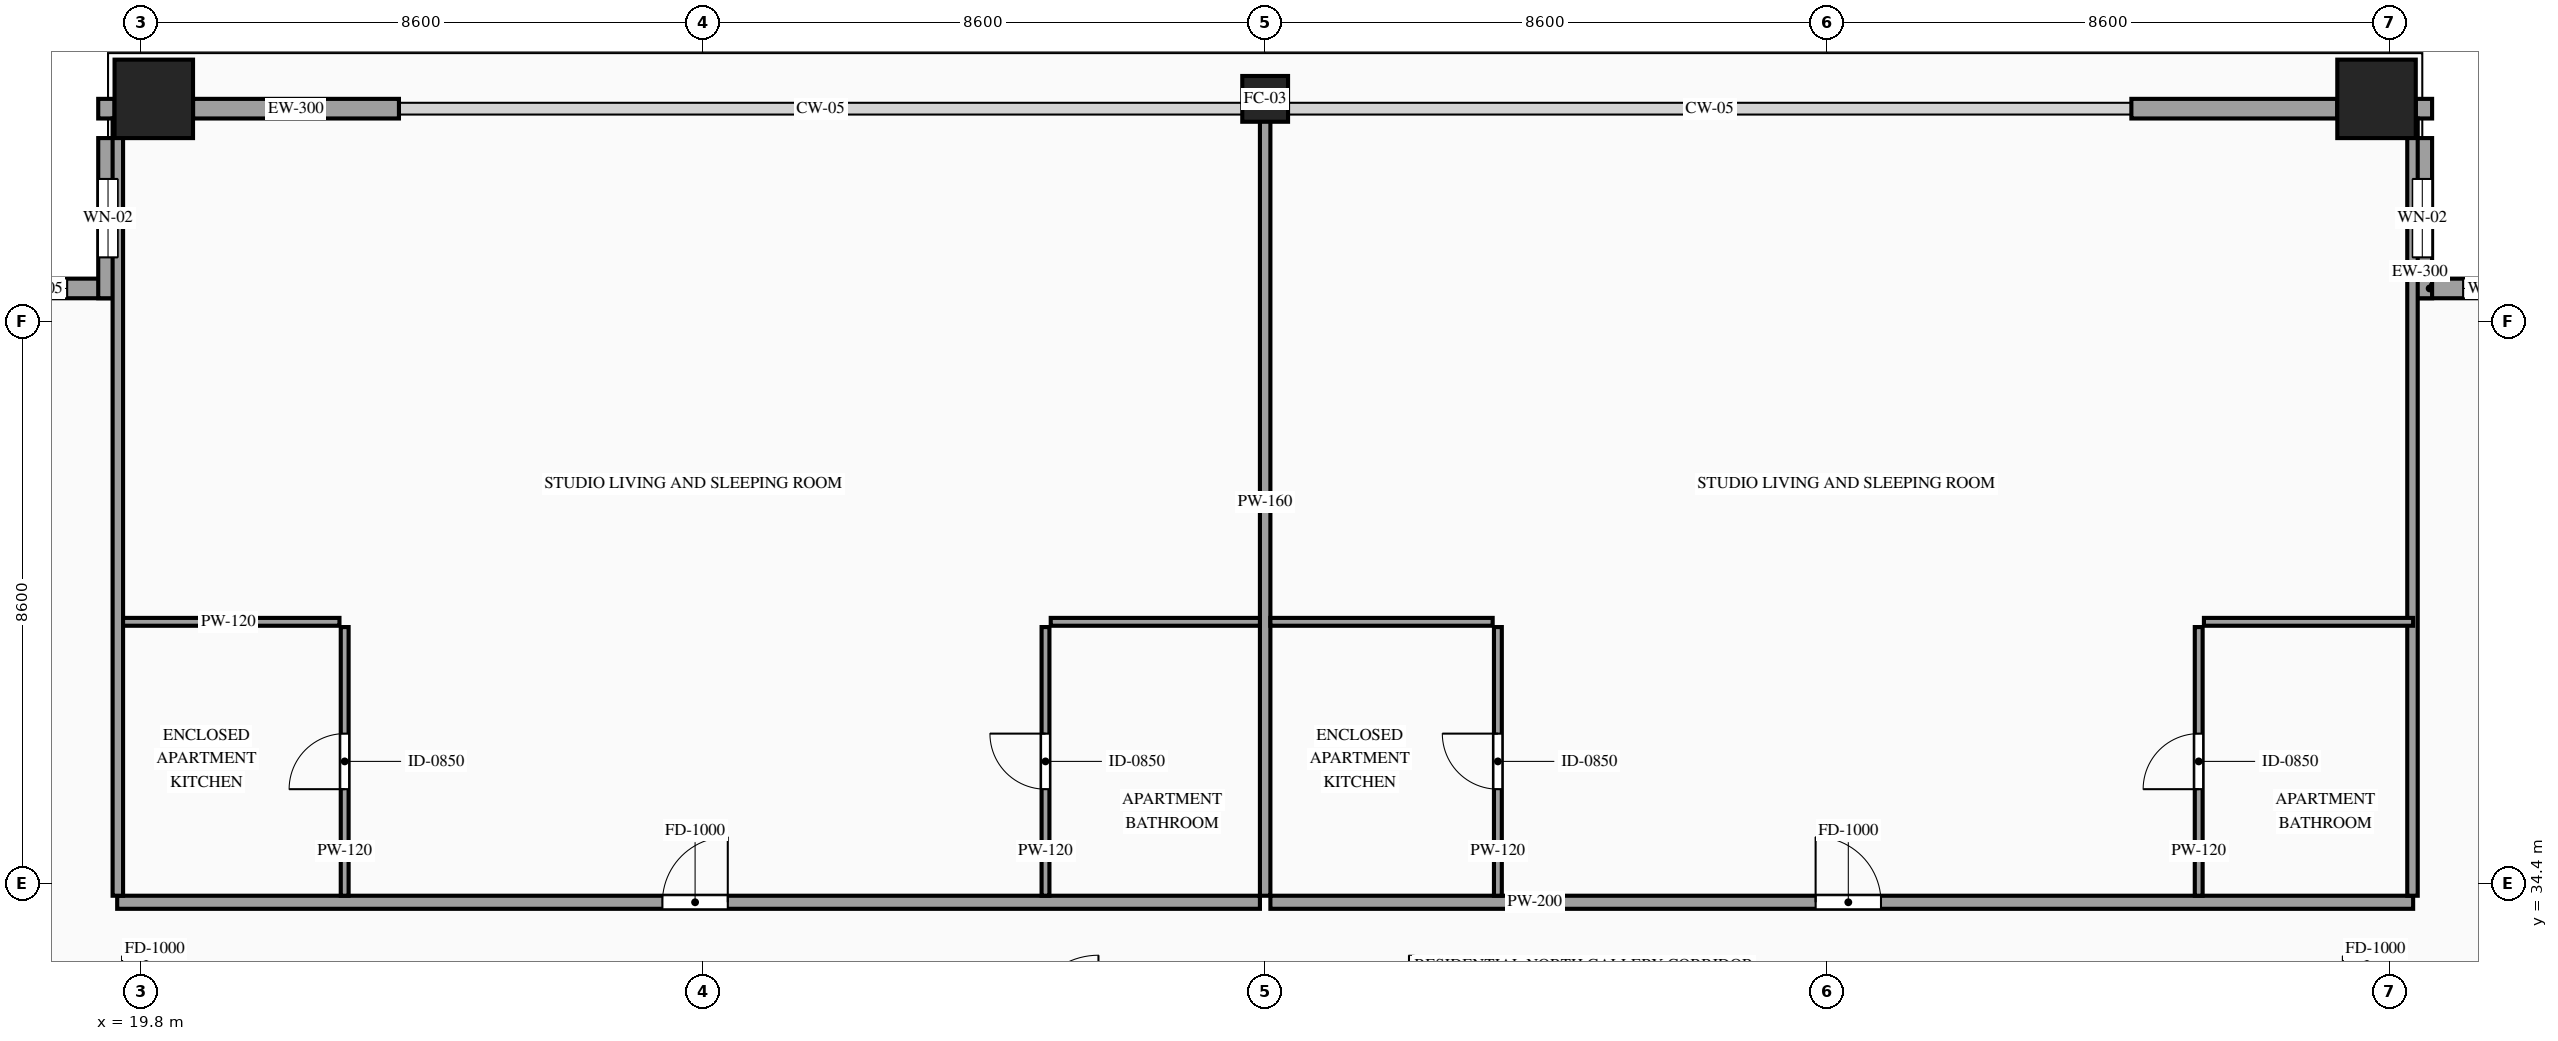
"""IFC4 building model, lengths in metres.
Left out: names, types, materials, properties, quantities, classifications, styles, units other than length and angle.
Written with IfcOpenShell. Run it as: python <this file> out.ifc"""

import sys

from ifc_helpers import new_model, si_unit, direction, frame, frame_2d, origin, origin_2d, place, context, subcontext, project, spatial, rectangle, hollow_rectangle, extrude, source, transform, mapped, element, fill, save


model = new_model("IFC4")
c1 = context("Model", 3, precision=1e-05, world=origin(), true_north=direction((0.0, 1.0)))
c2 = subcontext(c1, "Body", "Model", "MODEL_VIEW")
j1 = project(units=[si_unit("LENGTHUNIT", "METRE"), si_unit("PLANEANGLEUNIT", "RADIAN")], contexts=[c1])
p1 = place(None, origin())
s1 = spatial("IfcSite", under=j1, at=p1, CompositionType="ELEMENT")
p2 = place(p1, origin())
s2 = spatial("IfcBuilding", under=s1, at=p2, CompositionType="ELEMENT")
p3 = place(p2, frame((0.0, 0.0, 224.1)))
s3 = spatial("IfcBuildingStorey", under=s2, at=p3, CompositionType="ELEMENT", Elevation=224.1)
m1 = source(origin(), c2, "Body", "SweptSolid", [
    extrude(hollow_rectangle(XDim=1.2, YDim=1.2, WallThickness=0.055, at=origin_2d()), origin(), (0.0, 0.0, 1.0), 3.5),
])
p4 = place(p3, frame((20.0, 46.4, 0.0), z_axis=(0.0, 0.0, 1.0), x_axis=(1.0, 0.0, 0.0)))
e1 = element("IfcColumn", 1, at=p4, inside=s3, PredefinedType="COLUMN", context=c2, shape_type="MappedRepresentation", body=[
    mapped(m1, transform((0.0, 0.0, 0.0), scale=1.0)),
])
m2 = source(origin(), c2, "Body", "SweptSolid", [
    extrude(hollow_rectangle(XDim=0.7, YDim=0.7, WallThickness=0.032, at=origin_2d()), origin(), (0.0, 0.0, 1.0), 3.5),
])
p5 = place(p3, frame((37.0, 46.4, 0.0), z_axis=(0.0, 0.0, 1.0), x_axis=(1.0, 0.0, 0.0)))
e2 = element("IfcColumn", 2, at=p5, inside=s3, PredefinedType="COLUMN", context=c2, shape_type="MappedRepresentation", body=[
    mapped(m2, transform((0.0, 0.0, 0.0), scale=1.0)),
])
p6 = place(p3, frame((54.0, 46.4, 0.0), z_axis=(0.0, 0.0, 1.0), x_axis=(1.0, 0.0, 0.0)))
e3 = element("IfcColumn", 3, at=p6, inside=s3, PredefinedType="COLUMN", context=c2, shape_type="MappedRepresentation", body=[
    mapped(m1, transform((0.0, 0.0, 0.0), scale=1.0)),
])
p7 = place(p3, frame((19.45, 43.5, 0.0), z_axis=(0.0, 0.0, 1.0), x_axis=(-1.0, 0.0, 0.0)))
e4 = element("IfcWall", 4, at=p7, inside=s3, PredefinedType="SOLIDWALL", context=c2, shape_type="SweptSolid", body=[
    extrude(rectangle(XDim=2.45, YDim=0.3, at=frame_2d((1.225, 0.0))), origin(), (0.0, 0.0, 1.0), 3.28),
])
p8 = place(p7, frame((0.775, 0.0, 0.85)))
e5 = element("IfcOpeningElement", 5, at=p8, cuts=e4, PredefinedType="OPENING", context=c2, shape_type="SweptSolid", body=[
    extrude(rectangle(XDim=0.9, YDim=1.5, at=frame_2d((0.45, 0.75))), frame((0.0, 0.165, 0.0), z_axis=(0.0, -1.0, 0.0), x_axis=(1.0, 0.0, 0.0)), (0.0, 0.0, 1.0), 0.33),
])
p9 = place(p3, frame((19.3, 45.8, 0.0), z_axis=(0.0, 0.0, 1.0), x_axis=(0.0, -1.0, 0.0)))
e6 = element("IfcWall", 6, at=p9, inside=s3, PredefinedType="SOLIDWALL", context=c2, shape_type="SweptSolid", body=[
    extrude(rectangle(XDim=2.45, YDim=0.3, at=frame_2d((1.225, 0.0))), origin(), (0.0, 0.0, 1.0), 3.28),
])
p10 = place(p9, frame((0.625, 0.0, 0.85)))
e7 = element("IfcOpeningElement", 7, at=p10, cuts=e6, PredefinedType="OPENING", context=c2, shape_type="SweptSolid", body=[
    extrude(rectangle(XDim=1.2, YDim=2.1, at=frame_2d((0.6, 1.05))), frame((0.0, 0.165, 0.0), z_axis=(0.0, -1.0, 0.0), x_axis=(1.0, 0.0, 0.0)), (0.0, 0.0, 1.0), 0.33),
])
p11 = place(p3, frame((57.0, 43.5, 0.0), z_axis=(0.0, 0.0, 1.0), x_axis=(-1.0, 0.0, 0.0)))
e8 = element("IfcWall", 8, at=p11, inside=s3, PredefinedType="SOLIDWALL", context=c2, shape_type="SweptSolid", body=[
    extrude(rectangle(XDim=2.45, YDim=0.3, at=frame_2d((1.225, 0.0))), origin(), (0.0, 0.0, 1.0), 3.28),
])
p12 = place(p11, frame((0.775, 0.0, 0.85)))
e9 = element("IfcOpeningElement", 9, at=p12, cuts=e8, PredefinedType="OPENING", context=c2, shape_type="SweptSolid", body=[
    extrude(rectangle(XDim=0.9, YDim=1.5, at=frame_2d((0.45, 0.75))), frame((0.0, 0.165, 0.0), z_axis=(0.0, -1.0, 0.0), x_axis=(1.0, 0.0, 0.0)), (0.0, 0.0, 1.0), 0.33),
])
p13 = place(p3, frame((54.7, 43.35, 0.0), z_axis=(0.0, 0.0, 1.0), x_axis=(0.0, 1.0, 0.0)))
e10 = element("IfcWall", 10, at=p13, inside=s3, PredefinedType="SOLIDWALL", context=c2, shape_type="SweptSolid", body=[
    extrude(rectangle(XDim=2.45, YDim=0.3, at=frame_2d((1.225, 0.0))), origin(), (0.0, 0.0, 1.0), 3.28),
])
p14 = place(p13, frame((0.625, 0.0, 0.85)))
e11 = element("IfcOpeningElement", 11, at=p14, cuts=e10, PredefinedType="OPENING", context=c2, shape_type="SweptSolid", body=[
    extrude(rectangle(XDim=1.2, YDim=2.1, at=frame_2d((0.6, 1.05))), frame((0.0, 0.165, 0.0), z_axis=(0.0, -1.0, 0.0), x_axis=(1.0, 0.0, 0.0)), (0.0, 0.0, 1.0), 0.33),
])
m3 = source(origin(), c2, "Body", "SweptSolid", [
    extrude(rectangle(XDim=0.25, YDim=0.3, at=frame_2d((0.125, 0.0))), origin(), (0.0, 0.0, 1.0), 3.28),
])
for number, where, z_axis, x_axis in (
    (12, (19.15, 46.25, 0.0), (0.0, 0.0, 1.0), (1.0, 0.0, 0.0)),
    (13, (54.6, 46.25, 0.0), (0.0, 0.0, 1.0), (1.0, 0.0, 0.0)),
):
    element("IfcWall", number, at=place(p3, frame(where, z_axis=z_axis, x_axis=x_axis)), inside=s3, PredefinedType="SOLIDWALL", context=c2, shape_type="MappedRepresentation", body=[
        mapped(m3, transform((0.0, 0.0, 0.0), scale=1.0)),
    ])
m4 = source(origin(), c2, "Body", "SweptSolid", [
    extrude(rectangle(XDim=3.15, YDim=0.3, at=frame_2d((1.575, 0.0))), origin(), (0.0, 0.0, 1.0), 2.835),
])
for number, where, z_axis, x_axis in (
    (14, (20.6, 46.25, 0.0), (0.0, 0.0, 1.0), (1.0, 0.0, 0.0)),
    (15, (50.25, 46.25, 0.0), (0.0, 0.0, 1.0), (1.0, 0.0, 0.0)),
):
    element("IfcWall", number, at=place(p3, frame(where, z_axis=z_axis, x_axis=x_axis)), inside=s3, PredefinedType="SOLIDWALL", context=c2, shape_type="MappedRepresentation", body=[
        mapped(m4, transform((0.0, 0.0, 0.0), scale=1.0)),
    ])
p15 = place(p3, frame((19.44, 34.11, 0.0), z_axis=(0.0, 0.0, 1.0), x_axis=(1.0, 0.0, 0.0)))
e16 = element("IfcWall", 16, at=p15, inside=s3, PredefinedType="PARTITIONING", context=c2, shape_type="SweptSolid", body=[
    extrude(rectangle(XDim=17.48, YDim=0.2, at=frame_2d((8.74, 0.0))), origin(), (0.0, 0.0, 1.0), 3.28),
])
p16 = place(p15, frame((8.34, 0.0, 0.0)))
e17 = element("IfcOpeningElement", 17, at=p16, cuts=e16, PredefinedType="OPENING", context=c2, shape_type="SweptSolid", body=[
    extrude(rectangle(XDim=1.0, YDim=2.2, at=frame_2d((0.5, 1.1))), frame((0.0, 0.115, 0.0), z_axis=(0.0, -1.0, 0.0), x_axis=(1.0, 0.0, 0.0)), (0.0, 0.0, 1.0), 0.23),
])
m5 = source(origin(), c2, "Body", "SweptSolid", [
    extrude(rectangle(XDim=12.04, YDim=0.16, at=frame_2d((6.02, 0.0))), origin(), (0.0, 0.0, 1.0), 2.787),
])
p17 = place(p3, frame((37.0, 34.21, 0.0), z_axis=(0.0, 0.0, 1.0), x_axis=(0.0, 1.0, 0.0)))
e18 = element("IfcWall", 18, at=p17, inside=s3, PredefinedType="PARTITIONING", context=c2, shape_type="MappedRepresentation", body=[
    mapped(m5, transform((0.0, 0.0, 0.0), scale=1.0)),
])
m6 = source(origin(), c2, "Body", "SweptSolid", [
    extrude(rectangle(XDim=3.4, YDim=0.12, at=frame_2d((1.7, 0.0))), origin(), (0.0, 0.0, 1.0), 3.28),
])
p18 = place(p3, frame((19.44, 38.4, 0.0), z_axis=(0.0, 0.0, 1.0), x_axis=(1.0, 0.0, 0.0)))
e19 = element("IfcWall", 19, at=p18, inside=s3, PredefinedType="PARTITIONING", context=c2, shape_type="MappedRepresentation", body=[
    mapped(m6, transform((0.0, 0.0, 0.0), scale=1.0)),
])
p19 = place(p3, frame((22.92, 34.21, 0.0), z_axis=(0.0, 0.0, 1.0), x_axis=(0.0, 1.0, 0.0)))
e20 = element("IfcWall", 20, at=p19, inside=s3, PredefinedType="PARTITIONING", context=c2, shape_type="SweptSolid", body=[
    extrude(rectangle(XDim=4.11, YDim=0.12, at=frame_2d((2.055, 0.0))), origin(), (0.0, 0.0, 1.0), 3.28),
])
p20 = place(p19, frame((1.63, 0.0, 0.0)))
e21 = element("IfcOpeningElement", 21, at=p20, cuts=e20, PredefinedType="OPENING", context=c2, shape_type="SweptSolid", body=[
    extrude(rectangle(XDim=0.85, YDim=2.1, at=frame_2d((0.425, 1.05))), frame((0.0, 0.075, 0.0), z_axis=(0.0, -1.0, 0.0), x_axis=(1.0, 0.0, 0.0)), (0.0, 0.0, 1.0), 0.15),
])
m7 = source(origin(), c2, "Body", "SweptSolid", [
    extrude(rectangle(XDim=3.2, YDim=0.12, at=frame_2d((1.6, 0.0))), origin(), (0.0, 0.0, 1.0), 3.28),
])
p21 = place(p3, frame((33.72, 38.4, 0.0), z_axis=(0.0, 0.0, 1.0), x_axis=(1.0, 0.0, 0.0)))
e22 = element("IfcWall", 22, at=p21, inside=s3, PredefinedType="PARTITIONING", context=c2, shape_type="MappedRepresentation", body=[
    mapped(m7, transform((0.0, 0.0, 0.0), scale=1.0)),
])
p22 = place(p3, frame((33.64, 34.21, 0.0), z_axis=(0.0, 0.0, 1.0), x_axis=(0.0, 1.0, 0.0)))
e23 = element("IfcWall", 23, at=p22, inside=s3, PredefinedType="PARTITIONING", context=c2, shape_type="SweptSolid", body=[
    extrude(rectangle(XDim=4.11, YDim=0.12, at=frame_2d((2.055, 0.0))), origin(), (0.0, 0.0, 1.0), 3.28),
])
p23 = place(p22, frame((1.63, 0.0, 0.0)))
e24 = element("IfcOpeningElement", 24, at=p23, cuts=e23, PredefinedType="OPENING", context=c2, shape_type="SweptSolid", body=[
    extrude(rectangle(XDim=0.85, YDim=2.1, at=frame_2d((0.425, 1.05))), frame((0.0, 0.075, 0.0), z_axis=(0.0, -1.0, 0.0), x_axis=(1.0, 0.0, 0.0)), (0.0, 0.0, 1.0), 0.15),
])
p24 = place(p3, frame((37.08, 34.11, 0.0), z_axis=(0.0, 0.0, 1.0), x_axis=(1.0, 0.0, 0.0)))
e25 = element("IfcWall", 25, at=p24, inside=s3, PredefinedType="PARTITIONING", context=c2, shape_type="SweptSolid", body=[
    extrude(rectangle(XDim=17.48, YDim=0.2, at=frame_2d((8.74, 0.0))), origin(), (0.0, 0.0, 1.0), 3.28),
])
p25 = place(p24, frame((8.34, 0.0, 0.0)))
e26 = element("IfcOpeningElement", 26, at=p25, cuts=e25, PredefinedType="OPENING", context=c2, shape_type="SweptSolid", body=[
    extrude(rectangle(XDim=1.0, YDim=2.2, at=frame_2d((0.5, 1.1))), frame((0.0, 0.115, 0.0), z_axis=(0.0, -1.0, 0.0), x_axis=(1.0, 0.0, 0.0)), (0.0, 0.0, 1.0), 0.23),
])
m8 = source(origin(), c2, "Body", "SweptSolid", [
    extrude(rectangle(XDim=11.89, YDim=0.16, at=frame_2d((5.945, 0.0))), origin(), (0.0, 0.0, 1.0), 3.28),
])
for number, where, z_axis, x_axis in (
    (27, (19.45, 34.21, 0.0), (0.0, 0.0, 1.0), (0.0, 1.0, 0.0)),
    (28, (54.55, 34.21, 0.0), (0.0, 0.0, 1.0), (0.0, 1.0, 0.0)),
):
    element("IfcWall", number, at=place(p3, frame(where, z_axis=z_axis, x_axis=x_axis)), inside=s3, PredefinedType="PARTITIONING", context=c2, shape_type="MappedRepresentation", body=[
        mapped(m8, transform((0.0, 0.0, 0.0), scale=1.0)),
    ])
m9 = source(origin(), c2, "Body", "SweptSolid", [
    extrude(rectangle(XDim=3.4, YDim=0.12, at=frame_2d((1.7, 0.0))), origin(), (0.0, 0.0, 1.0), 3.28),
])
p26 = place(p3, frame((37.08, 38.4, 0.0), z_axis=(0.0, 0.0, 1.0), x_axis=(1.0, 0.0, 0.0)))
e29 = element("IfcWall", 29, at=p26, inside=s3, PredefinedType="PARTITIONING", context=c2, shape_type="MappedRepresentation", body=[
    mapped(m9, transform((0.0, 0.0, 0.0), scale=1.0)),
])
p27 = place(p3, frame((40.56, 34.21, 0.0), z_axis=(0.0, 0.0, 1.0), x_axis=(0.0, 1.0, 0.0)))
e30 = element("IfcWall", 30, at=p27, inside=s3, PredefinedType="PARTITIONING", context=c2, shape_type="SweptSolid", body=[
    extrude(rectangle(XDim=4.11, YDim=0.12, at=frame_2d((2.055, 0.0))), origin(), (0.0, 0.0, 1.0), 3.28),
])
p28 = place(p27, frame((1.63, 0.0, 0.0)))
e31 = element("IfcOpeningElement", 31, at=p28, cuts=e30, PredefinedType="OPENING", context=c2, shape_type="SweptSolid", body=[
    extrude(rectangle(XDim=0.85, YDim=2.1, at=frame_2d((0.425, 1.05))), frame((0.0, 0.075, 0.0), z_axis=(0.0, -1.0, 0.0), x_axis=(1.0, 0.0, 0.0)), (0.0, 0.0, 1.0), 0.15),
])
p29 = place(p3, frame((51.36, 38.4, 0.0), z_axis=(0.0, 0.0, 1.0), x_axis=(1.0, 0.0, 0.0)))
e32 = element("IfcWall", 32, at=p29, inside=s3, PredefinedType="PARTITIONING", context=c2, shape_type="MappedRepresentation", body=[
    mapped(m7, transform((0.0, 0.0, 0.0), scale=1.0)),
])
p30 = place(p3, frame((51.28, 34.21, 0.0), z_axis=(0.0, 0.0, 1.0), x_axis=(0.0, 1.0, 0.0)))
e33 = element("IfcWall", 33, at=p30, inside=s3, PredefinedType="PARTITIONING", context=c2, shape_type="SweptSolid", body=[
    extrude(rectangle(XDim=4.11, YDim=0.12, at=frame_2d((2.055, 0.0))), origin(), (0.0, 0.0, 1.0), 3.28),
])
p31 = place(p30, frame((1.63, 0.0, 0.0)))
e34 = element("IfcOpeningElement", 34, at=p31, cuts=e33, PredefinedType="OPENING", context=c2, shape_type="SweptSolid", body=[
    extrude(rectangle(XDim=0.85, YDim=2.1, at=frame_2d((0.425, 1.05))), frame((0.0, 0.075, 0.0), z_axis=(0.0, -1.0, 0.0), x_axis=(1.0, 0.0, 0.0)), (0.0, 0.0, 1.0), 0.15),
])
m10 = source(origin(), c2, "Body", "SweptSolid", [
    extrude(rectangle(XDim=0.9, YDim=1.5, at=frame_2d((0.45, 0.75))), frame((0.0, 0.03, 0.0), z_axis=(0.0, -1.0, 0.0), x_axis=(1.0, 0.0, 0.0)), (0.0, 0.0, 1.0), 0.06),
])
p32 = place(p8, origin())
e35 = element("IfcWindow", 35, at=p32, inside=s3, PartitioningType="SINGLE_PANEL", PredefinedType="WINDOW", context=c2, shape_type="MappedRepresentation", body=[
    mapped(m10, transform((0.0, 0.0, 0.0), scale=1.0)),
])
fill(e5, e35)
m11 = source(origin(), c2, "Body", "SweptSolid", [
    extrude(rectangle(XDim=1.2, YDim=2.1, at=frame_2d((0.6, 1.05))), frame((0.0, 0.03, 0.0), z_axis=(0.0, -1.0, 0.0), x_axis=(1.0, 0.0, 0.0)), (0.0, 0.0, 1.0), 0.06),
])
p33 = place(p10, origin())
e36 = element("IfcWindow", 36, at=p33, inside=s3, PartitioningType="SINGLE_PANEL", PredefinedType="WINDOW", context=c2, shape_type="MappedRepresentation", body=[
    mapped(m11, transform((0.0, 0.0, 0.0), scale=1.0)),
])
fill(e7, e36)
p34 = place(p12, origin())
e37 = element("IfcWindow", 37, at=p34, inside=s3, PartitioningType="SINGLE_PANEL", PredefinedType="WINDOW", context=c2, shape_type="MappedRepresentation", body=[
    mapped(m10, transform((0.0, 0.0, 0.0), scale=1.0)),
])
fill(e9, e37)
p35 = place(p14, origin())
e38 = element("IfcWindow", 38, at=p35, inside=s3, PartitioningType="SINGLE_PANEL", PredefinedType="WINDOW", context=c2, shape_type="MappedRepresentation", body=[
    mapped(m11, transform((0.0, 0.0, 0.0), scale=1.0)),
])
fill(e11, e38)
m12 = source(origin(), c2, "Body", "SweptSolid", [
    extrude(rectangle(XDim=1.0, YDim=2.2, at=frame_2d((0.5, 1.1))), frame((0.0, 0.025, 0.0), z_axis=(0.0, -1.0, 0.0), x_axis=(1.0, 0.0, 0.0)), (0.0, 0.0, 1.0), 0.05),
])
p36 = place(p16, origin())
e39 = element("IfcDoor", 39, at=p36, inside=s3, OperationType="SINGLE_SWING_RIGHT", PredefinedType="DOOR", context=c2, shape_type="MappedRepresentation", body=[
    mapped(m12, transform((0.0, 0.0, 0.0), scale=1.0)),
])
fill(e17, e39)
m13 = source(origin(), c2, "Body", "SweptSolid", [
    extrude(rectangle(XDim=0.85, YDim=2.1, at=frame_2d((0.425, 1.05))), frame((0.0, 0.025, 0.0), z_axis=(0.0, -1.0, 0.0), x_axis=(1.0, 0.0, 0.0)), (0.0, 0.0, 1.0), 0.05),
])
p37 = place(p20, origin())
e40 = element("IfcDoor", 40, at=p37, inside=s3, OperationType="SINGLE_SWING_LEFT", PredefinedType="DOOR", context=c2, shape_type="MappedRepresentation", body=[
    mapped(m13, transform((0.0, 0.0, 0.0), scale=1.0)),
])
fill(e21, e40)
p38 = place(p23, origin())
e41 = element("IfcDoor", 41, at=p38, inside=s3, OperationType="SINGLE_SWING_RIGHT", PredefinedType="DOOR", context=c2, shape_type="MappedRepresentation", body=[
    mapped(m13, transform((0.0, 0.0, 0.0), scale=1.0)),
])
fill(e24, e41)
p39 = place(p25, origin())
e42 = element("IfcDoor", 42, at=p39, inside=s3, OperationType="SINGLE_SWING_LEFT", PredefinedType="DOOR", context=c2, shape_type="MappedRepresentation", body=[
    mapped(m12, transform((0.0, 0.0, 0.0), scale=1.0)),
])
fill(e26, e42)
p40 = place(p28, origin())
e43 = element("IfcDoor", 43, at=p40, inside=s3, OperationType="SINGLE_SWING_RIGHT", PredefinedType="DOOR", context=c2, shape_type="MappedRepresentation", body=[
    mapped(m13, transform((0.0, 0.0, 0.0), scale=1.0)),
])
fill(e31, e43)
p41 = place(p31, origin())
e44 = element("IfcDoor", 44, at=p41, inside=s3, OperationType="SINGLE_SWING_LEFT", PredefinedType="DOOR", context=c2, shape_type="MappedRepresentation", body=[
    mapped(m13, transform((0.0, 0.0, 0.0), scale=1.0)),
])
fill(e34, e44)
save(model, sys.argv[1])
